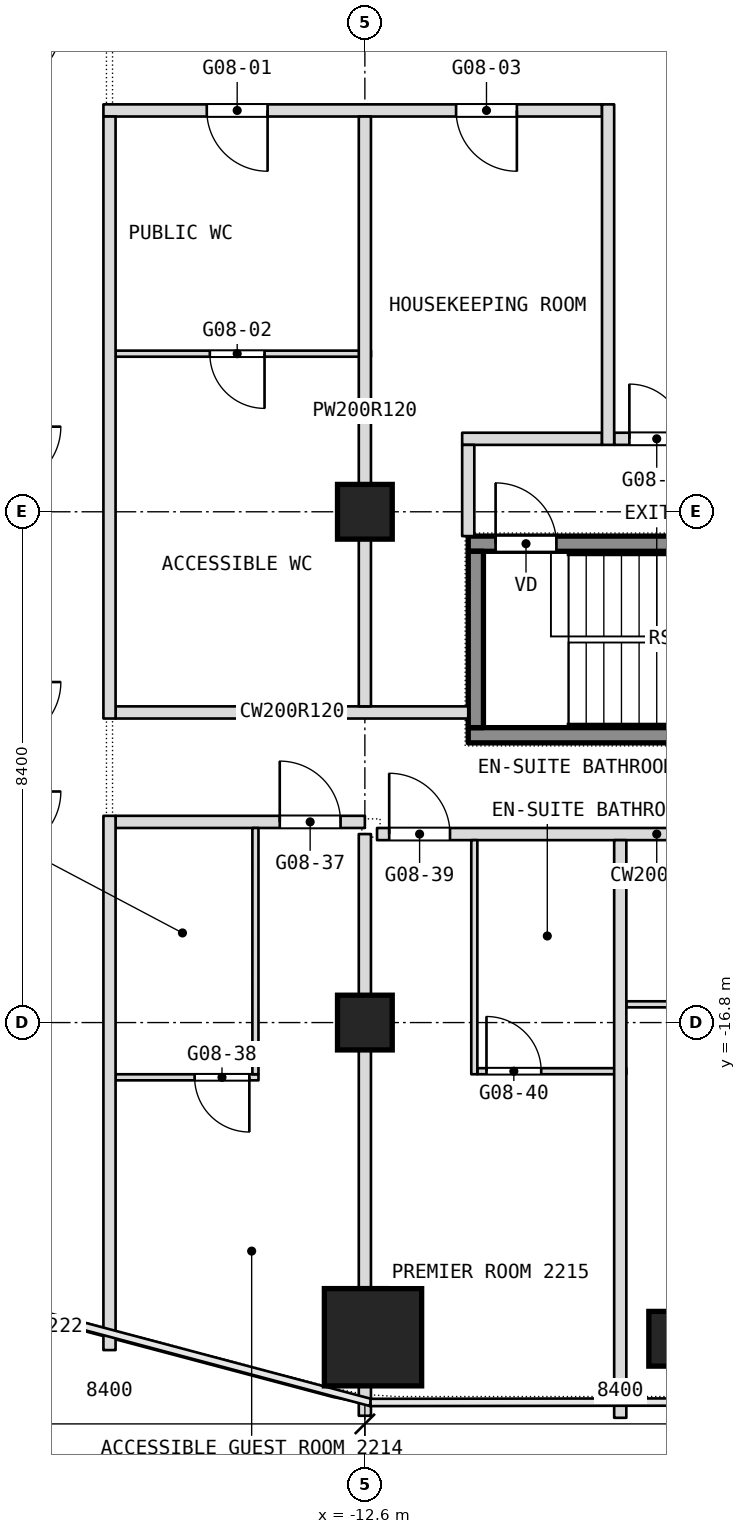
"""IFC4 building model, lengths in metres.
Left out: names, types, materials, properties, quantities, classifications, styles, units other than length and angle.
Written with IfcOpenShell. Run it as: python <this file> out.ifc"""

import sys

from ifc_helpers import new_model, si_unit, direction, frame, frame_2d, origin, origin_2d, place, context, subcontext, project, spatial, rectangle, extrude, element, fill, save


model = new_model("IFC4")
c1 = context("Model", 3, precision=1e-05, world=origin(), true_north=direction((0.0, 1.0)))
c2 = subcontext(c1, "Body", "Model", "MODEL_VIEW")
j1 = project(units=[si_unit("LENGTHUNIT", "METRE"), si_unit("PLANEANGLEUNIT", "RADIAN")], contexts=[c1])
p1 = place(None, origin())
s1 = spatial("IfcSite", under=j1, at=p1, CompositionType="ELEMENT")
p2 = place(p1, origin())
s2 = spatial("IfcBuilding", under=s1, at=p2, CompositionType="ELEMENT")
p3 = place(p2, frame((0.0, 0.0, 104.9)))
s3 = spatial("IfcBuildingStorey", under=s2, at=p3, CompositionType="ELEMENT", Elevation=104.9)
p4 = place(p3, frame((-12.466, -21.975, 0.0), z_axis=(0.0, 0.0, 1.0), x_axis=(1.0, 0.0, 0.0)))
e1 = element("IfcColumn", 1, at=p4, inside=s3, PredefinedType="COLUMN", context=c2, shape_type="SweptSolid", body=[
    extrude(rectangle(XDim=1.6, YDim=1.6, at=origin_2d()), origin(), (0.0, 0.0, 1.0), 3.6),
])
for number, where, z_axis, x_axis in (
    (2, (-12.6, -16.8, 0.0), (0.0, 0.0, 1.0), (1.0, 0.0, 0.0)),
    (3, (-12.6, -8.4, 0.0), (0.0, 0.0, 1.0), (1.0, 0.0, 0.0)),
    (4, (-7.48, -22.0, 0.0), (0.0, 0.0, 1.0), (1.0, 0.0, 0.0)),
):
    element("IfcColumn", number, at=place(p3, frame(where, z_axis=z_axis, x_axis=x_axis)), inside=s3, PredefinedType="COLUMN", context=c2, shape_type="SweptSolid", body=[
        extrude(rectangle(XDim=0.9, YDim=0.9, at=origin_2d()), origin(), (0.0, 0.0, 1.0), 3.6),
    ])
p5 = place(p3, frame((-16.7, -17.7, 0.0), z_axis=(0.0, 0.0, 1.0), x_axis=(1.0, 0.0, 0.0)))
e5 = element("IfcWall", 5, at=p5, inside=s3, PredefinedType="PARTITIONING", context=c2, shape_type="SweptSolid", body=[
    extrude(rectangle(XDim=2.35, YDim=0.1, at=frame_2d((1.175, 0.0))), origin(), (0.0, 0.0, 1.0), 3.34),
])
p6 = place(p5, frame((1.3, 0.0, 0.0)))
e6 = element("IfcOpeningElement", 6, at=p6, cuts=e5, PredefinedType="OPENING", context=c2, shape_type="SweptSolid", body=[
    extrude(rectangle(XDim=0.9, YDim=2.1, at=frame_2d((0.45, 1.05))), frame((0.0, 0.05, 0.0), z_axis=(0.0, -1.0, 0.0), x_axis=(1.0, 0.0, 0.0)), (0.0, 0.0, 1.0), 0.1),
])
p7 = place(p3, frame((-10.75, -17.6, 0.0), z_axis=(0.0, 0.0, 1.0), x_axis=(1.0, 0.0, 0.0)))
e7 = element("IfcWall", 7, at=p7, inside=s3, PredefinedType="PARTITIONING", context=c2, shape_type="SweptSolid", body=[
    extrude(rectangle(XDim=2.45, YDim=0.1, at=frame_2d((1.225, 0.0))), origin(), (0.0, 0.0, 1.0), 3.34),
])
p8 = place(p7, frame((0.15, 0.0, 0.0)))
e8 = element("IfcOpeningElement", 8, at=p8, cuts=e7, PredefinedType="OPENING", context=c2, shape_type="SweptSolid", body=[
    extrude(rectangle(XDim=0.9, YDim=2.1, at=frame_2d((0.45, 1.05))), frame((0.0, 0.05, 0.0), z_axis=(0.0, -1.0, 0.0), x_axis=(1.0, 0.0, 0.0)), (0.0, 0.0, 1.0), 0.1),
])
p9 = place(p3, frame((-8.3, -16.5, 0.0), z_axis=(0.0, 0.0, 1.0), x_axis=(1.0, 0.0, 0.0)))
e9 = element("IfcWall", 9, at=p9, inside=s3, PredefinedType="PARTITIONING", context=c2, shape_type="SweptSolid", body=[
    extrude(rectangle(XDim=2.35, YDim=0.1, at=frame_2d((1.175, 0.0))), origin(), (0.0, 0.0, 1.0), 3.34),
])
p10 = place(p9, frame((1.3, 0.0, 0.0)))
e10 = element("IfcOpeningElement", 10, at=p10, cuts=e9, PredefinedType="OPENING", context=c2, shape_type="SweptSolid", body=[
    extrude(rectangle(XDim=0.9, YDim=2.1, at=frame_2d((0.45, 1.05))), frame((0.0, 0.05, 0.0), z_axis=(0.0, -1.0, 0.0), x_axis=(1.0, 0.0, 0.0)), (0.0, 0.0, 1.0), 0.1),
])
p11 = place(p3, frame((-12.4, -13.7, 0.0), z_axis=(0.0, 0.0, 1.0), x_axis=(1.0, 0.0, 0.0)))
e11 = element("IfcWall", 11, at=p11, inside=s3, PredefinedType="PARTITIONING", context=c2, shape_type="SweptSolid", body=[
    extrude(rectangle(XDim=9.2, YDim=0.2, at=frame_2d((4.6, 0.0))), origin(), (0.0, 0.0, 1.0), 3.34),
])
p12 = place(p11, frame((0.2, 0.0, 0.0)))
e12 = element("IfcOpeningElement", 12, at=p12, cuts=e11, PredefinedType="OPENING", context=c2, shape_type="SweptSolid", body=[
    extrude(rectangle(XDim=1.0, YDim=2.1, at=frame_2d((0.5, 1.05))), frame((0.0, 0.1, 0.0), z_axis=(0.0, -1.0, 0.0), x_axis=(1.0, 0.0, 0.0)), (0.0, 0.0, 1.0), 0.2),
])
p13 = place(p11, frame((6.8, 0.0, 0.0)))
e13 = element("IfcOpeningElement", 13, at=p13, cuts=e11, PredefinedType="OPENING", context=c2, shape_type="SweptSolid", body=[
    extrude(rectangle(XDim=1.0, YDim=2.1, at=frame_2d((0.5, 1.05))), frame((0.0, 0.1, 0.0), z_axis=(0.0, -1.0, 0.0), x_axis=(1.0, 0.0, 0.0)), (0.0, 0.0, 1.0), 0.2),
])
p14 = place(p3, frame((-16.7, -13.5, 0.0), z_axis=(0.0, 0.0, 1.0), x_axis=(1.0, 0.0, 0.0)))
e14 = element("IfcWall", 14, at=p14, inside=s3, PredefinedType="PARTITIONING", context=c2, shape_type="SweptSolid", body=[
    extrude(rectangle(XDim=4.1, YDim=0.2, at=frame_2d((2.05, 0.0))), origin(), (0.0, 0.0, 1.0), 3.34),
])
p15 = place(p14, frame((2.7, 0.0, 0.0)))
e15 = element("IfcOpeningElement", 15, at=p15, cuts=e14, PredefinedType="OPENING", context=c2, shape_type="SweptSolid", body=[
    extrude(rectangle(XDim=1.0, YDim=2.1, at=frame_2d((0.5, 1.05))), frame((0.0, 0.1, 0.0), z_axis=(0.0, -1.0, 0.0), x_axis=(1.0, 0.0, 0.0)), (0.0, 0.0, 1.0), 0.2),
])
p16 = place(p3, frame((-16.7, -11.7, 0.0), z_axis=(0.0, 0.0, 1.0), x_axis=(1.0, 0.0, 0.0)))
e16 = element("IfcWall", 16, at=p16, inside=s3, PredefinedType="PARTITIONING", context=c2, shape_type="SweptSolid", body=[
    extrude(rectangle(XDim=5.8, YDim=0.2, at=frame_2d((2.9, 0.0))), origin(), (0.0, 0.0, 1.0), 3.34),
])
p17 = place(p3, frame((-11.0, -7.2, 0.0), z_axis=(0.0, 0.0, 1.0), x_axis=(1.0, 0.0, 0.0)))
e17 = element("IfcWall", 17, at=p17, inside=s3, PredefinedType="PARTITIONING", context=c2, shape_type="SweptSolid", body=[
    extrude(rectangle(XDim=2.3, YDim=0.2, at=frame_2d((1.15, 0.0))), origin(), (0.0, 0.0, 1.0), 3.34),
])
p18 = place(p3, frame((-8.5, -7.2, 0.0), z_axis=(0.0, 0.0, 1.0), x_axis=(1.0, 0.0, 0.0)))
e18 = element("IfcWall", 18, at=p18, inside=s3, PredefinedType="PARTITIONING", context=c2, shape_type="SweptSolid", body=[
    extrude(rectangle(XDim=3.7, YDim=0.2, at=frame_2d((1.85, 0.0))), origin(), (0.0, 0.0, 1.0), 3.34),
])
p19 = place(p18, frame((0.25, 0.0, 0.0)))
e19 = element("IfcOpeningElement", 19, at=p19, cuts=e18, PredefinedType="OPENING", context=c2, shape_type="SweptSolid", body=[
    extrude(rectangle(XDim=0.9, YDim=2.1, at=frame_2d((0.45, 1.05))), frame((0.0, 0.1, 0.0), z_axis=(0.0, -1.0, 0.0), x_axis=(1.0, 0.0, 0.0)), (0.0, 0.0, 1.0), 0.2),
])
p20 = place(p3, frame((-16.7, -5.8, 0.0), z_axis=(0.0, 0.0, 1.0), x_axis=(1.0, 0.0, 0.0)))
e20 = element("IfcWall", 20, at=p20, inside=s3, PredefinedType="PARTITIONING", context=c2, shape_type="SweptSolid", body=[
    extrude(rectangle(XDim=4.2, YDim=0.1, at=frame_2d((2.1, 0.0))), origin(), (0.0, 0.0, 1.0), 3.34),
])
p21 = place(p20, frame((1.55, 0.0, 0.0)))
e21 = element("IfcOpeningElement", 21, at=p21, cuts=e20, PredefinedType="OPENING", context=c2, shape_type="SweptSolid", body=[
    extrude(rectangle(XDim=0.9, YDim=2.1, at=frame_2d((0.45, 1.05))), frame((0.0, 0.05, 0.0), z_axis=(0.0, -1.0, 0.0), x_axis=(1.0, 0.0, 0.0)), (0.0, 0.0, 1.0), 0.1),
])
p22 = place(p3, frame((-16.9, -1.8, 0.0), z_axis=(0.0, 0.0, 1.0), x_axis=(1.0, 0.0, 0.0)))
e22 = element("IfcWall", 22, at=p22, inside=s3, PredefinedType="PARTITIONING", context=c2, shape_type="SweptSolid", body=[
    extrude(rectangle(XDim=8.2, YDim=0.2, at=frame_2d((4.1, 0.0))), origin(), (0.0, 0.0, 1.0), 3.34),
])
p23 = place(p22, frame((1.7, 0.0, 0.0)))
e23 = element("IfcOpeningElement", 23, at=p23, cuts=e22, PredefinedType="OPENING", context=c2, shape_type="SweptSolid", body=[
    extrude(rectangle(XDim=1.0, YDim=2.1, at=frame_2d((0.5, 1.05))), frame((0.0, 0.1, 0.0), z_axis=(0.0, -1.0, 0.0), x_axis=(1.0, 0.0, 0.0)), (0.0, 0.0, 1.0), 0.2),
])
p24 = place(p22, frame((5.8, 0.0, 0.0)))
e24 = element("IfcOpeningElement", 24, at=p24, cuts=e22, PredefinedType="OPENING", context=c2, shape_type="SweptSolid", body=[
    extrude(rectangle(XDim=1.0, YDim=2.1, at=frame_2d((0.5, 1.05))), frame((0.0, 0.1, 0.0), z_axis=(0.0, -1.0, 0.0), x_axis=(1.0, 0.0, 0.0)), (0.0, 0.0, 1.0), 0.2),
])
p25 = place(p3, frame((-8.4, -23.3, 0.0), z_axis=(0.0, 0.0, 1.0), x_axis=(0.0, 1.0, 0.0)))
e25 = element("IfcWall", 25, at=p25, inside=s3, PredefinedType="PARTITIONING", context=c2, shape_type="SweptSolid", body=[
    extrude(rectangle(XDim=9.5, YDim=0.2, at=frame_2d((4.75, 0.0))), origin(), (0.0, 0.0, 1.0), 3.34),
])
p26 = place(p3, frame((-8.6, -7.3, 0.0), z_axis=(0.0, 0.0, 1.0), x_axis=(0.0, 1.0, 0.0)))
e26 = element("IfcWall", 26, at=p26, inside=s3, PredefinedType="PARTITIONING", context=c2, shape_type="SweptSolid", body=[
    extrude(rectangle(XDim=5.6, YDim=0.2, at=frame_2d((2.8, 0.0))), origin(), (0.0, 0.0, 1.0), 3.34),
])
p27 = place(p3, frame((-10.8, -17.65, 0.0), z_axis=(0.0, 0.0, 1.0), x_axis=(0.0, 1.0, 0.0)))
e27 = element("IfcWall", 27, at=p27, inside=s3, PredefinedType="PARTITIONING", context=c2, shape_type="SweptSolid", body=[
    extrude(rectangle(XDim=3.85, YDim=0.1, at=frame_2d((1.925, 0.0))), origin(), (0.0, 0.0, 1.0), 3.34),
])
p28 = place(p3, frame((-10.9, -8.8, 0.0), z_axis=(0.0, 0.0, 1.0), x_axis=(0.0, 1.0, 0.0)))
e28 = element("IfcWall", 28, at=p28, inside=s3, PredefinedType="PARTITIONING", context=c2, shape_type="SweptSolid", body=[
    extrude(rectangle(XDim=1.5, YDim=0.2, at=frame_2d((0.75, 0.0))), origin(), (0.0, 0.0, 1.0), 3.34),
])
p29 = place(p3, frame((-12.6, -23.266, 0.0), z_axis=(0.0, 0.0, 1.0), x_axis=(0.0, 1.0, 0.0)))
e29 = element("IfcWall", 29, at=p29, inside=s3, PredefinedType="PARTITIONING", context=c2, shape_type="SweptSolid", body=[
    extrude(rectangle(XDim=0.491, YDim=0.2, at=frame_2d((0.246, 0.0))), origin(), (0.0, 0.0, 1.0), 3.34),
])
p30 = place(p3, frame((-12.6, -21.175, 0.0), z_axis=(0.0, 0.0, 1.0), x_axis=(0.0, 1.0, 0.0)))
e30 = element("IfcWall", 30, at=p30, inside=s3, PredefinedType="PARTITIONING", context=c2, shape_type="SweptSolid", body=[
    extrude(rectangle(XDim=7.475, YDim=0.2, at=frame_2d((3.738, 0.0))), origin(), (0.0, 0.0, 1.0), 3.34),
])
p31 = place(p3, frame((-12.6, -11.6, 0.0), z_axis=(0.0, 0.0, 1.0), x_axis=(0.0, 1.0, 0.0)))
e31 = element("IfcWall", 31, at=p31, inside=s3, PredefinedType="PARTITIONING", context=c2, shape_type="SweptSolid", body=[
    extrude(rectangle(XDim=9.7, YDim=0.2, at=frame_2d((4.85, 0.0))), origin(), (0.0, 0.0, 1.0), 3.34),
])
p32 = place(p3, frame((-14.4, -17.65, 0.0), z_axis=(0.0, 0.0, 1.0), x_axis=(0.0, 1.0, 0.0)))
e32 = element("IfcWall", 32, at=p32, inside=s3, PredefinedType="PARTITIONING", context=c2, shape_type="SweptSolid", body=[
    extrude(rectangle(XDim=4.05, YDim=0.1, at=frame_2d((2.025, 0.0))), origin(), (0.0, 0.0, 1.0), 3.34),
])
p33 = place(p3, frame((-16.8, -22.186, 0.0), z_axis=(0.0, 0.0, 1.0), x_axis=(0.0, 1.0, 0.0)))
e33 = element("IfcWall", 33, at=p33, inside=s3, PredefinedType="PARTITIONING", context=c2, shape_type="SweptSolid", body=[
    extrude(rectangle(XDim=8.786, YDim=0.2, at=frame_2d((4.393, 0.0))), origin(), (0.0, 0.0, 1.0), 3.34),
])
p34 = place(p3, frame((-16.8, -11.8, 0.0), z_axis=(0.0, 0.0, 1.0), x_axis=(0.0, 1.0, 0.0)))
e34 = element("IfcWall", 34, at=p34, inside=s3, PredefinedType="PARTITIONING", context=c2, shape_type="SweptSolid", body=[
    extrude(rectangle(XDim=9.9, YDim=0.2, at=frame_2d((4.95, 0.0))), origin(), (0.0, 0.0, 1.0), 3.34),
])
p35 = place(p3, frame((-10.9, -12.075, 0.1), z_axis=(0.0, 0.0, 1.0), x_axis=(1.0, 0.0, 0.0)))
e35 = element("IfcWall", 35, at=p35, inside=s3, PredefinedType="SHEAR", context=c2, shape_type="SweptSolid", body=[
    extrude(rectangle(XDim=6.2, YDim=0.25, at=frame_2d((3.1, 0.0))), origin(), (0.0, 0.0, 1.0), 3.6),
])
p36 = place(p3, frame((-10.9, -8.925, 0.1), z_axis=(0.0, 0.0, 1.0), x_axis=(1.0, 0.0, 0.0)))
e36 = element("IfcWall", 36, at=p36, inside=s3, PredefinedType="SHEAR", context=c2, shape_type="SweptSolid", body=[
    extrude(rectangle(XDim=6.2, YDim=0.25, at=frame_2d((3.1, 0.0))), origin(), (0.0, 0.0, 1.0), 3.6),
])
p37 = place(p36, frame((0.45, 0.0, 0.0)))
e37 = element("IfcOpeningElement", 37, at=p37, cuts=e36, PredefinedType="OPENING", context=c2, shape_type="SweptSolid", body=[
    extrude(rectangle(XDim=1.0, YDim=2.1, at=frame_2d((0.5, 1.05))), frame((0.0, 0.125, 0.0), z_axis=(0.0, -1.0, 0.0), x_axis=(1.0, 0.0, 0.0)), (0.0, 0.0, 1.0), 0.25),
])
p38 = place(p3, frame((-10.775, -11.95, 0.1), z_axis=(0.0, 0.0, 1.0), x_axis=(0.0, 1.0, 0.0)))
e38 = element("IfcWall", 38, at=p38, inside=s3, PredefinedType="SHEAR", context=c2, shape_type="SweptSolid", body=[
    extrude(rectangle(XDim=2.9, YDim=0.25, at=frame_2d((1.45, 0.0))), origin(), (0.0, 0.0, 1.0), 3.6),
])
p39 = place(p6, origin())
e39 = element("IfcDoor", 39, at=p39, inside=s3, OperationType="SINGLE_SWING_RIGHT", PredefinedType="DOOR", context=c2, shape_type="SweptSolid", body=[
    extrude(rectangle(XDim=0.9, YDim=2.1, at=frame_2d((0.45, 1.05))), frame((0.0, 0.025, 0.0), z_axis=(0.0, -1.0, 0.0), x_axis=(1.0, 0.0, 0.0)), (0.0, 0.0, 1.0), 0.05),
])
fill(e6, e39)
p40 = place(p8, origin())
e40 = element("IfcDoor", 40, at=p40, inside=s3, OperationType="SINGLE_SWING_LEFT", PredefinedType="DOOR", context=c2, shape_type="SweptSolid", body=[
    extrude(rectangle(XDim=0.9, YDim=2.1, at=frame_2d((0.45, 1.05))), frame((0.0, 0.025, 0.0), z_axis=(0.0, -1.0, 0.0), x_axis=(1.0, 0.0, 0.0)), (0.0, 0.0, 1.0), 0.05),
])
fill(e8, e40)
p41 = place(p12, origin())
e41 = element("IfcDoor", 41, at=p41, inside=s3, OperationType="SINGLE_SWING_RIGHT", PredefinedType="DOOR", context=c2, shape_type="SweptSolid", body=[
    extrude(rectangle(XDim=1.0, YDim=2.1, at=frame_2d((0.5, 1.05))), frame((0.0, 0.025, 0.0), z_axis=(0.0, -1.0, 0.0), x_axis=(1.0, 0.0, 0.0)), (0.0, 0.0, 1.0), 0.05),
])
fill(e12, e41)
p42 = place(p15, origin())
e42 = element("IfcDoor", 42, at=p42, inside=s3, OperationType="SINGLE_SWING_LEFT", PredefinedType="DOOR", context=c2, shape_type="SweptSolid", body=[
    extrude(rectangle(XDim=1.0, YDim=2.1, at=frame_2d((0.5, 1.05))), frame((0.0, 0.025, 0.0), z_axis=(0.0, -1.0, 0.0), x_axis=(1.0, 0.0, 0.0)), (0.0, 0.0, 1.0), 0.05),
])
fill(e15, e42)
p43 = place(p19, origin())
e43 = element("IfcDoor", 43, at=p43, inside=s3, OperationType="SINGLE_SWING_RIGHT", PredefinedType="DOOR", context=c2, shape_type="SweptSolid", body=[
    extrude(rectangle(XDim=0.9, YDim=2.1, at=frame_2d((0.45, 1.05))), frame((0.0, 0.025, 0.0), z_axis=(0.0, -1.0, 0.0), x_axis=(1.0, 0.0, 0.0)), (0.0, 0.0, 1.0), 0.05),
])
fill(e19, e43)
p44 = place(p21, origin())
e44 = element("IfcDoor", 44, at=p44, inside=s3, OperationType="SINGLE_SWING_RIGHT", PredefinedType="DOOR", context=c2, shape_type="SweptSolid", body=[
    extrude(rectangle(XDim=0.9, YDim=2.1, at=frame_2d((0.45, 1.05))), frame((0.0, 0.025, 0.0), z_axis=(0.0, -1.0, 0.0), x_axis=(1.0, 0.0, 0.0)), (0.0, 0.0, 1.0), 0.05),
])
fill(e21, e44)
p45 = place(p23, origin())
e45 = element("IfcDoor", 45, at=p45, inside=s3, OperationType="SINGLE_SWING_LEFT", PredefinedType="DOOR", context=c2, shape_type="SweptSolid", body=[
    extrude(rectangle(XDim=1.0, YDim=2.1, at=frame_2d((0.5, 1.05))), frame((0.0, 0.025, 0.0), z_axis=(0.0, -1.0, 0.0), x_axis=(1.0, 0.0, 0.0)), (0.0, 0.0, 1.0), 0.05),
])
fill(e23, e45)
p46 = place(p24, origin())
e46 = element("IfcDoor", 46, at=p46, inside=s3, OperationType="SINGLE_SWING_LEFT", PredefinedType="DOOR", context=c2, shape_type="SweptSolid", body=[
    extrude(rectangle(XDim=1.0, YDim=2.1, at=frame_2d((0.5, 1.05))), frame((0.0, 0.025, 0.0), z_axis=(0.0, -1.0, 0.0), x_axis=(1.0, 0.0, 0.0)), (0.0, 0.0, 1.0), 0.05),
])
fill(e24, e46)
p47 = place(p37, origin())
e47 = element("IfcDoor", 47, at=p47, inside=s3, OperationType="SINGLE_SWING_LEFT", PredefinedType="DOOR", context=c2, shape_type="SweptSolid", body=[
    extrude(rectangle(XDim=1.0, YDim=2.1, at=frame_2d((0.5, 1.05))), frame((0.0, 0.025, 0.0), z_axis=(0.0, -1.0, 0.0), x_axis=(1.0, 0.0, 0.0)), (0.0, 0.0, 1.0), 0.05),
])
fill(e37, e47)
save(model, sys.argv[1])
